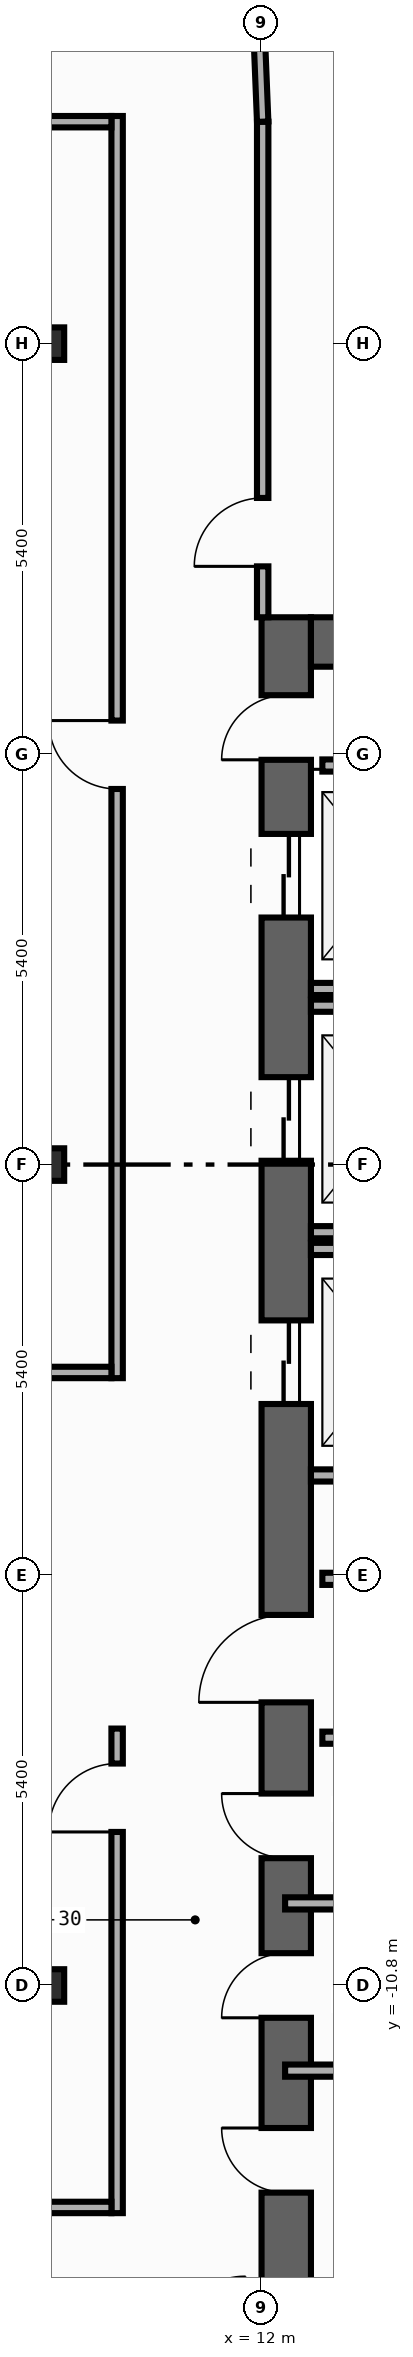
"""IFC4 building model, lengths in metres.
Left out: names, types, materials, properties, quantities, classifications, styles, units other than length and angle.
Written with IfcOpenShell. Run it as: python <this file> out.ifc"""

import sys

from ifc_helpers import new_model, si_unit, direction, frame, frame_2d, origin, origin_2d, place, context, subcontext, project, spatial, rectangle, i_section, extrude, element, fill, save


model = new_model("IFC4")
c1 = context("Model", 3, precision=1e-05, world=origin(), true_north=direction((0.0, 1.0)))
c2 = subcontext(c1, "Body", "Model", "MODEL_VIEW")
j1 = project(units=[si_unit("LENGTHUNIT", "METRE"), si_unit("PLANEANGLEUNIT", "RADIAN")], contexts=[c1])
p1 = place(None, origin())
s1 = spatial("IfcSite", under=j1, at=p1, CompositionType="ELEMENT")
p2 = place(p1, origin())
s2 = spatial("IfcBuilding", under=s1, at=p2, CompositionType="ELEMENT")
p3 = place(p2, frame((0.0, 0.0, 233.2)))
s3 = spatial("IfcBuildingStorey", under=s2, at=p3, CompositionType="ELEMENT", Elevation=233.2)
p4 = place(p3, frame((12.325, -19.8, 0.0), z_axis=(0.0, 0.0, 1.0), x_axis=(0.0, 1.0, 0.0)))
e1 = element("IfcWall", 1, at=p4, inside=s3, PredefinedType="SHEAR", context=c2, shape_type="SweptSolid", body=[
    extrude(rectangle(XDim=27.0, YDim=0.65, at=frame_2d((13.5, 0.0))), origin(), (0.0, 0.0, 1.0), 3.34),
])
p5 = place(p4, frame((23.05, 0.0, 0.0)))
e2 = element("IfcOpeningElement", 2, at=p5, cuts=e1, PredefinedType="OPENING", context=c2, shape_type="SweptSolid", body=[
    extrude(rectangle(XDim=1.1, YDim=2.2, at=frame_2d((0.55, 1.1))), frame((0.0, 0.335, 0.0), z_axis=(0.0, -1.0, 0.0), x_axis=(1.0, 0.0, 0.0)), (0.0, 0.0, 1.0), 0.67),
])
p6 = place(p4, frame((19.85, 0.0, 0.0)))
e3 = element("IfcOpeningElement", 3, at=p6, cuts=e1, PredefinedType="OPENING", context=c2, shape_type="SweptSolid", body=[
    extrude(rectangle(XDim=1.1, YDim=2.2, at=frame_2d((0.55, 1.1))), frame((0.0, 0.335, 0.0), z_axis=(0.0, -1.0, 0.0), x_axis=(1.0, 0.0, 0.0)), (0.0, 0.0, 1.0), 0.67),
])
p7 = place(p4, frame((16.65, 0.0, 0.0)))
e4 = element("IfcOpeningElement", 4, at=p7, cuts=e1, PredefinedType="OPENING", context=c2, shape_type="SweptSolid", body=[
    extrude(rectangle(XDim=1.1, YDim=2.2, at=frame_2d((0.55, 1.1))), frame((0.0, 0.335, 0.0), z_axis=(0.0, -1.0, 0.0), x_axis=(1.0, 0.0, 0.0)), (0.0, 0.0, 1.0), 0.67),
])
p8 = place(p4, frame((6.275, 0.0, 0.0)))
e5 = element("IfcOpeningElement", 5, at=p8, cuts=e1, PredefinedType="OPENING", context=c2, shape_type="SweptSolid", body=[
    extrude(rectangle(XDim=0.85, YDim=2.1, at=frame_2d((0.425, 1.05))), frame((0.0, 0.335, 0.0), z_axis=(0.0, -1.0, 0.0), x_axis=(1.0, 0.0, 0.0)), (0.0, 0.0, 1.0), 0.67),
])
p9 = place(p4, frame((8.575, 0.0, 0.0)))
e6 = element("IfcOpeningElement", 6, at=p9, cuts=e1, PredefinedType="OPENING", context=c2, shape_type="SweptSolid", body=[
    extrude(rectangle(XDim=0.85, YDim=2.1, at=frame_2d((0.425, 1.05))), frame((0.0, 0.335, 0.0), z_axis=(0.0, -1.0, 0.0), x_axis=(1.0, 0.0, 0.0)), (0.0, 0.0, 1.0), 0.67),
])
p10 = place(p4, frame((10.675, 0.0, 0.0)))
e7 = element("IfcOpeningElement", 7, at=p10, cuts=e1, PredefinedType="OPENING", context=c2, shape_type="SweptSolid", body=[
    extrude(rectangle(XDim=0.85, YDim=2.1, at=frame_2d((0.425, 1.05))), frame((0.0, 0.335, 0.0), z_axis=(0.0, -1.0, 0.0), x_axis=(1.0, 0.0, 0.0)), (0.0, 0.0, 1.0), 0.67),
])
p11 = place(p4, frame((12.725, 0.0, 0.0)))
e8 = element("IfcOpeningElement", 8, at=p11, cuts=e1, PredefinedType="OPENING", context=c2, shape_type="SweptSolid", body=[
    extrude(rectangle(XDim=1.15, YDim=2.2, at=frame_2d((0.575, 1.1))), frame((0.0, 0.335, 0.0), z_axis=(0.0, -1.0, 0.0), x_axis=(1.0, 0.0, 0.0)), (0.0, 0.0, 1.0), 0.67),
])
p12 = place(p4, frame((25.125, 0.0, 0.0)))
e9 = element("IfcOpeningElement", 9, at=p12, cuts=e1, PredefinedType="OPENING", context=c2, shape_type="SweptSolid", body=[
    extrude(rectangle(XDim=0.85, YDim=2.1, at=frame_2d((0.425, 1.05))), frame((0.0, 0.335, 0.0), z_axis=(0.0, -1.0, 0.0), x_axis=(1.0, 0.0, 0.0)), (0.0, 0.0, 1.0), 0.67),
])
p13 = place(p3, frame((12.65, 6.875, 0.0), z_axis=(0.0, 0.0, 1.0), x_axis=(1.0, 0.0, 0.0)))
e10 = element("IfcWall", 10, at=p13, inside=s3, PredefinedType="SHEAR", context=c2, shape_type="SweptSolid", body=[
    extrude(rectangle(XDim=7.1, YDim=0.65, at=frame_2d((3.55, 0.0))), origin(), (0.0, 0.0, 1.0), 3.34),
])
for number, where, z_axis, x_axis in (
    (11, (9.2, -10.8, 0.0), (0.0, 0.0, 1.0), (1.0, 0.0, 0.0)),
    (12, (9.2, 0.0, 0.0), (0.0, 0.0, 1.0), (1.0, 0.0, 0.0)),
    (13, (9.2, 10.8, 0.0), (0.0, 0.0, 1.0), (1.0, 0.0, 0.0)),
):
    element("IfcColumn", number, at=place(p3, frame(where, z_axis=z_axis, x_axis=x_axis)), inside=s3, PredefinedType="COLUMN", context=c2, shape_type="SweptSolid", body=[
        extrude(i_section(OverallWidth=0.407, OverallDepth=0.428, WebThickness=0.02, FlangeThickness=0.035, FilletRadius=0.022, at=origin_2d()), origin(), (0.0, 0.0, 1.0), 3.6),
    ])
for number, where, z_axis, x_axis in (
    (14, (12.65, 2.31, 0.0), (0.0, 0.0, 1.0), (1.0, 0.0, 0.0)),
    (15, (12.65, -0.89, 0.0), (0.0, 0.0, 1.0), (1.0, 0.0, 0.0)),
    (16, (12.65, 2.09, 0.0), (0.0, 0.0, 1.0), (1.0, 0.0, 0.0)),
    (17, (12.65, -4.09, 0.0), (0.0, 0.0, 1.0), (1.0, 0.0, 0.0)),
    (18, (12.65, -1.11, 0.0), (0.0, 0.0, 1.0), (1.0, 0.0, 0.0)),
):
    element("IfcWall", number, at=place(p3, frame(where, z_axis=z_axis, x_axis=x_axis)), inside=s3, PredefinedType="STANDARD", context=c2, shape_type="SweptSolid", body=[
        extrude(rectangle(XDim=2.34, YDim=0.16, at=frame_2d((1.17, 0.0))), origin(), (0.0, 0.0, 1.0), 3.34),
    ])
for number, where, z_axis, x_axis in (
    (19, (12.8, -5.45, 0.0), (0.0, 0.0, 1.0), (1.0, 0.0, 0.0)),
    (20, (12.8, -7.54, 0.0), (0.0, 0.0, 1.0), (1.0, 0.0, 0.0)),
    (21, (12.8, 5.25, 0.0), (0.0, 0.0, 1.0), (1.0, 0.0, 0.0)),
):
    element("IfcWall", number, at=place(p3, frame(where, z_axis=z_axis, x_axis=x_axis)), inside=s3, PredefinedType="STANDARD", context=c2, shape_type="SweptSolid", body=[
        extrude(rectangle(XDim=2.6, YDim=0.16, at=frame_2d((1.3, 0.0))), origin(), (0.0, 0.0, 1.0), 3.34),
    ])
for number, where, z_axis, x_axis in (
    (22, (12.31, -11.92, 0.0), (0.0, 0.0, 1.0), (1.0, 0.0, 0.0)),
    (23, (12.31, -9.72, 0.0), (0.0, 0.0, 1.0), (1.0, 0.0, 0.0)),
):
    element("IfcWall", number, at=place(p3, frame(where, z_axis=z_axis, x_axis=x_axis)), inside=s3, PredefinedType="PARTITIONING", context=c2, shape_type="SweptSolid", body=[
        extrude(rectangle(XDim=3.065, YDim=0.16, at=frame_2d((1.532, 0.0))), origin(), (0.0, 0.0, 1.0), 3.34),
    ])
p14 = place(p3, frame((12.015, 7.2, 0.0), z_axis=(0.0, 0.0, 1.0), x_axis=(0.0, 1.0, 0.0)))
e24 = element("IfcWall", 24, at=p14, inside=s3, PredefinedType="PARTITIONING", context=c2, shape_type="SweptSolid", body=[
    extrude(rectangle(XDim=6.52, YDim=0.15, at=frame_2d((3.26, 0.0))), origin(), (0.0, 0.0, 1.0), 3.34),
])
p15 = place(p14, frame((0.67, 0.0, 0.0)))
e25 = element("IfcOpeningElement", 25, at=p15, cuts=e24, PredefinedType="OPENING", context=c2, shape_type="SweptSolid", body=[
    extrude(rectangle(XDim=0.9, YDim=2.15, at=frame_2d((0.45, 1.075))), frame((0.0, 0.085, 0.0), z_axis=(0.0, -1.0, 0.0), x_axis=(1.0, 0.0, 0.0)), (0.0, 0.0, 1.0), 0.17),
])
p16 = place(p3, frame((10.1, -2.81, 0.0), z_axis=(0.0, 0.0, 1.0), x_axis=(0.0, 1.0, 0.0)))
e26 = element("IfcWall", 26, at=p16, inside=s3, PredefinedType="PARTITIONING", context=c2, shape_type="SweptSolid", body=[
    extrude(rectangle(XDim=16.605, YDim=0.15, at=frame_2d((8.302, 0.0))), origin(), (0.0, 0.0, 1.0), 3.34),
])
p17 = place(p16, frame((7.751, 0.0, 0.0)))
e27 = element("IfcOpeningElement", 27, at=p17, cuts=e26, PredefinedType="OPENING", context=c2, shape_type="SweptSolid", body=[
    extrude(rectangle(XDim=0.9, YDim=2.15, at=frame_2d((0.45, 1.075))), frame((0.0, 0.085, 0.0), z_axis=(0.0, -1.0, 0.0), x_axis=(1.0, 0.0, 0.0)), (0.0, 0.0, 1.0), 0.17),
])
p18 = place(p3, frame((10.1, -13.795, 0.0), z_axis=(0.0, 0.0, 1.0), x_axis=(0.0, 1.0, 0.0)))
e28 = element("IfcWall", 28, at=p18, inside=s3, PredefinedType="PARTITIONING", context=c2, shape_type="SweptSolid", body=[
    extrude(rectangle(XDim=6.375, YDim=0.15, at=frame_2d((3.188, 0.0))), origin(), (0.0, 0.0, 1.0), 3.34),
])
p19 = place(p18, frame((5.015, 0.0, 0.0)))
e29 = element("IfcOpeningElement", 29, at=p19, cuts=e28, PredefinedType="OPENING", context=c2, shape_type="SweptSolid", body=[
    extrude(rectangle(XDim=0.9, YDim=2.15, at=frame_2d((0.45, 1.075))), frame((0.0, 0.085, 0.0), z_axis=(0.0, -1.0, 0.0), x_axis=(1.0, 0.0, 0.0)), (0.0, 0.0, 1.0), 0.17),
])
p20 = place(p3, frame((-3.01, -2.735, 0.0), z_axis=(0.0, 0.0, 1.0), x_axis=(1.0, 0.0, 0.0)))
e30 = element("IfcWall", 30, at=p20, inside=s3, PredefinedType="PARTITIONING", context=c2, shape_type="SweptSolid", body=[
    extrude(rectangle(XDim=13.035, YDim=0.15, at=frame_2d((6.518, 0.0))), origin(), (0.0, 0.0, 1.0), 3.34),
])
p21 = place(p20, frame((2.463, 0.0, 0.0)))
e31 = element("IfcOpeningElement", 31, at=p21, cuts=e30, PredefinedType="OPENING", context=c2, shape_type="SweptSolid", body=[
    extrude(rectangle(XDim=0.9, YDim=2.15, at=frame_2d((0.45, 1.075))), frame((0.0, 0.085, 0.0), z_axis=(0.0, -1.0, 0.0), x_axis=(1.0, 0.0, 0.0)), (0.0, 0.0, 1.0), 0.17),
])
p22 = place(p3, frame((12.015, 13.72, 0.0), z_axis=(0.0, 0.0, 1.0), x_axis=(-0.040046877756, 0.99919780203, 0.0)))
e32 = element("IfcWall", 32, at=p22, inside=s3, PredefinedType="PARTITIONING", context=c2, shape_type="SweptSolid", body=[
    extrude(rectangle(XDim=1.731, YDim=0.15, at=frame_2d((0.866, 0.0))), origin(), (0.0, 0.0, 1.0), 3.34),
])
p23 = place(p3, frame((-2.86, 13.72, 0.0), z_axis=(0.0, 0.0, 1.0), x_axis=(1.0, 0.0, 0.0)))
e33 = element("IfcWall", 33, at=p23, inside=s3, PredefinedType="PARTITIONING", context=c2, shape_type="SweptSolid", body=[
    extrude(rectangle(XDim=12.885, YDim=0.15, at=frame_2d((6.442, 0.0))), origin(), (0.0, 0.0, 1.0), 3.34),
])
p24 = place(p23, frame((4.685, 0.0, 0.0)))
e34 = element("IfcOpeningElement", 34, at=p24, cuts=e33, PredefinedType="OPENING", context=c2, shape_type="SweptSolid", body=[
    extrude(rectangle(XDim=0.9, YDim=2.15, at=frame_2d((0.45, 1.075))), frame((0.0, 0.085, 0.0), z_axis=(0.0, -1.0, 0.0), x_axis=(1.0, 0.0, 0.0)), (0.0, 0.0, 1.0), 0.17),
])
p25 = place(p3, frame((-3.03, -13.72, 0.0), z_axis=(0.0, 0.0, 1.0), x_axis=(1.0, 0.0, 0.0)))
e35 = element("IfcWall", 35, at=p25, inside=s3, PredefinedType="PARTITIONING", context=c2, shape_type="SweptSolid", body=[
    extrude(rectangle(XDim=13.055, YDim=0.15, at=frame_2d((6.527, 0.0))), origin(), (0.0, 0.0, 1.0), 3.34),
])
p26 = place(p25, frame((4.874, 0.0, 0.0)))
e36 = element("IfcOpeningElement", 36, at=p26, cuts=e35, PredefinedType="OPENING", context=c2, shape_type="SweptSolid", body=[
    extrude(rectangle(XDim=0.9, YDim=2.15, at=frame_2d((0.45, 1.075))), frame((0.0, 0.085, 0.0), z_axis=(0.0, -1.0, 0.0), x_axis=(1.0, 0.0, 0.0)), (0.0, 0.0, 1.0), 0.17),
])
p27 = place(p5, origin())
e37 = element("IfcDoor", 37, at=p27, inside=s3, OperationType="DOUBLE_DOOR_SLIDING", PredefinedType="DOOR", context=c2, shape_type="SweptSolid", body=[
    extrude(rectangle(XDim=1.1, YDim=2.2, at=frame_2d((0.55, 1.1))), frame((0.0, 0.025, 0.0), z_axis=(0.0, -1.0, 0.0), x_axis=(1.0, 0.0, 0.0)), (0.0, 0.0, 1.0), 0.05),
])
fill(e2, e37)
p28 = place(p6, origin())
e38 = element("IfcDoor", 38, at=p28, inside=s3, OperationType="DOUBLE_DOOR_SLIDING", PredefinedType="DOOR", context=c2, shape_type="SweptSolid", body=[
    extrude(rectangle(XDim=1.1, YDim=2.2, at=frame_2d((0.55, 1.1))), frame((0.0, 0.025, 0.0), z_axis=(0.0, -1.0, 0.0), x_axis=(1.0, 0.0, 0.0)), (0.0, 0.0, 1.0), 0.05),
])
fill(e3, e38)
p29 = place(p7, origin())
e39 = element("IfcDoor", 39, at=p29, inside=s3, OperationType="DOUBLE_DOOR_SLIDING", PredefinedType="DOOR", context=c2, shape_type="SweptSolid", body=[
    extrude(rectangle(XDim=1.1, YDim=2.2, at=frame_2d((0.55, 1.1))), frame((0.0, 0.025, 0.0), z_axis=(0.0, -1.0, 0.0), x_axis=(1.0, 0.0, 0.0)), (0.0, 0.0, 1.0), 0.05),
])
fill(e4, e39)
p30 = place(p8, origin())
e40 = element("IfcDoor", 40, at=p30, inside=s3, OperationType="SINGLE_SWING_RIGHT", PredefinedType="DOOR", context=c2, shape_type="SweptSolid", body=[
    extrude(rectangle(XDim=0.85, YDim=2.1, at=frame_2d((0.425, 1.05))), frame((0.0, 0.025, 0.0), z_axis=(0.0, -1.0, 0.0), x_axis=(1.0, 0.0, 0.0)), (0.0, 0.0, 1.0), 0.05),
])
fill(e5, e40)
p31 = place(p9, origin())
e41 = element("IfcDoor", 41, at=p31, inside=s3, OperationType="SINGLE_SWING_LEFT", PredefinedType="DOOR", context=c2, shape_type="SweptSolid", body=[
    extrude(rectangle(XDim=0.85, YDim=2.1, at=frame_2d((0.425, 1.05))), frame((0.0, 0.025, 0.0), z_axis=(0.0, -1.0, 0.0), x_axis=(1.0, 0.0, 0.0)), (0.0, 0.0, 1.0), 0.05),
])
fill(e6, e41)
p32 = place(p10, origin())
e42 = element("IfcDoor", 42, at=p32, inside=s3, OperationType="SINGLE_SWING_RIGHT", PredefinedType="DOOR", context=c2, shape_type="SweptSolid", body=[
    extrude(rectangle(XDim=0.85, YDim=2.1, at=frame_2d((0.425, 1.05))), frame((0.0, 0.025, 0.0), z_axis=(0.0, -1.0, 0.0), x_axis=(1.0, 0.0, 0.0)), (0.0, 0.0, 1.0), 0.05),
])
fill(e7, e42)
p33 = place(p11, origin())
e43 = element("IfcDoor", 43, at=p33, inside=s3, OperationType="SINGLE_SWING_LEFT", PredefinedType="DOOR", context=c2, shape_type="SweptSolid", body=[
    extrude(rectangle(XDim=1.15, YDim=2.2, at=frame_2d((0.575, 1.1))), frame((0.0, 0.025, 0.0), z_axis=(0.0, -1.0, 0.0), x_axis=(1.0, 0.0, 0.0)), (0.0, 0.0, 1.0), 0.05),
])
fill(e8, e43)
p34 = place(p12, origin())
e44 = element("IfcDoor", 44, at=p34, inside=s3, OperationType="SINGLE_SWING_LEFT", PredefinedType="DOOR", context=c2, shape_type="SweptSolid", body=[
    extrude(rectangle(XDim=0.85, YDim=2.1, at=frame_2d((0.425, 1.05))), frame((0.0, 0.025, 0.0), z_axis=(0.0, -1.0, 0.0), x_axis=(1.0, 0.0, 0.0)), (0.0, 0.0, 1.0), 0.05),
])
fill(e9, e44)
p35 = place(p15, origin())
e45 = element("IfcDoor", 45, at=p35, inside=s3, OperationType="SINGLE_SWING_LEFT", PredefinedType="DOOR", context=c2, shape_type="SweptSolid", body=[
    extrude(rectangle(XDim=0.9, YDim=2.15, at=frame_2d((0.45, 1.075))), frame((0.0, 0.025, 0.0), z_axis=(0.0, -1.0, 0.0), x_axis=(1.0, 0.0, 0.0)), (0.0, 0.0, 1.0), 0.05),
])
fill(e25, e45)
p36 = place(p17, origin())
e46 = element("IfcDoor", 46, at=p36, inside=s3, OperationType="SINGLE_SWING_RIGHT", PredefinedType="DOOR", context=c2, shape_type="SweptSolid", body=[
    extrude(rectangle(XDim=0.9, YDim=2.15, at=frame_2d((0.45, 1.075))), frame((0.0, 0.025, 0.0), z_axis=(0.0, -1.0, 0.0), x_axis=(1.0, 0.0, 0.0)), (0.0, 0.0, 1.0), 0.05),
])
fill(e27, e46)
p37 = place(p19, origin())
e47 = element("IfcDoor", 47, at=p37, inside=s3, OperationType="SINGLE_SWING_LEFT", PredefinedType="DOOR", context=c2, shape_type="SweptSolid", body=[
    extrude(rectangle(XDim=0.9, YDim=2.15, at=frame_2d((0.45, 1.075))), frame((0.0, 0.025, 0.0), z_axis=(0.0, -1.0, 0.0), x_axis=(1.0, 0.0, 0.0)), (0.0, 0.0, 1.0), 0.05),
])
fill(e29, e47)
save(model, sys.argv[1])
